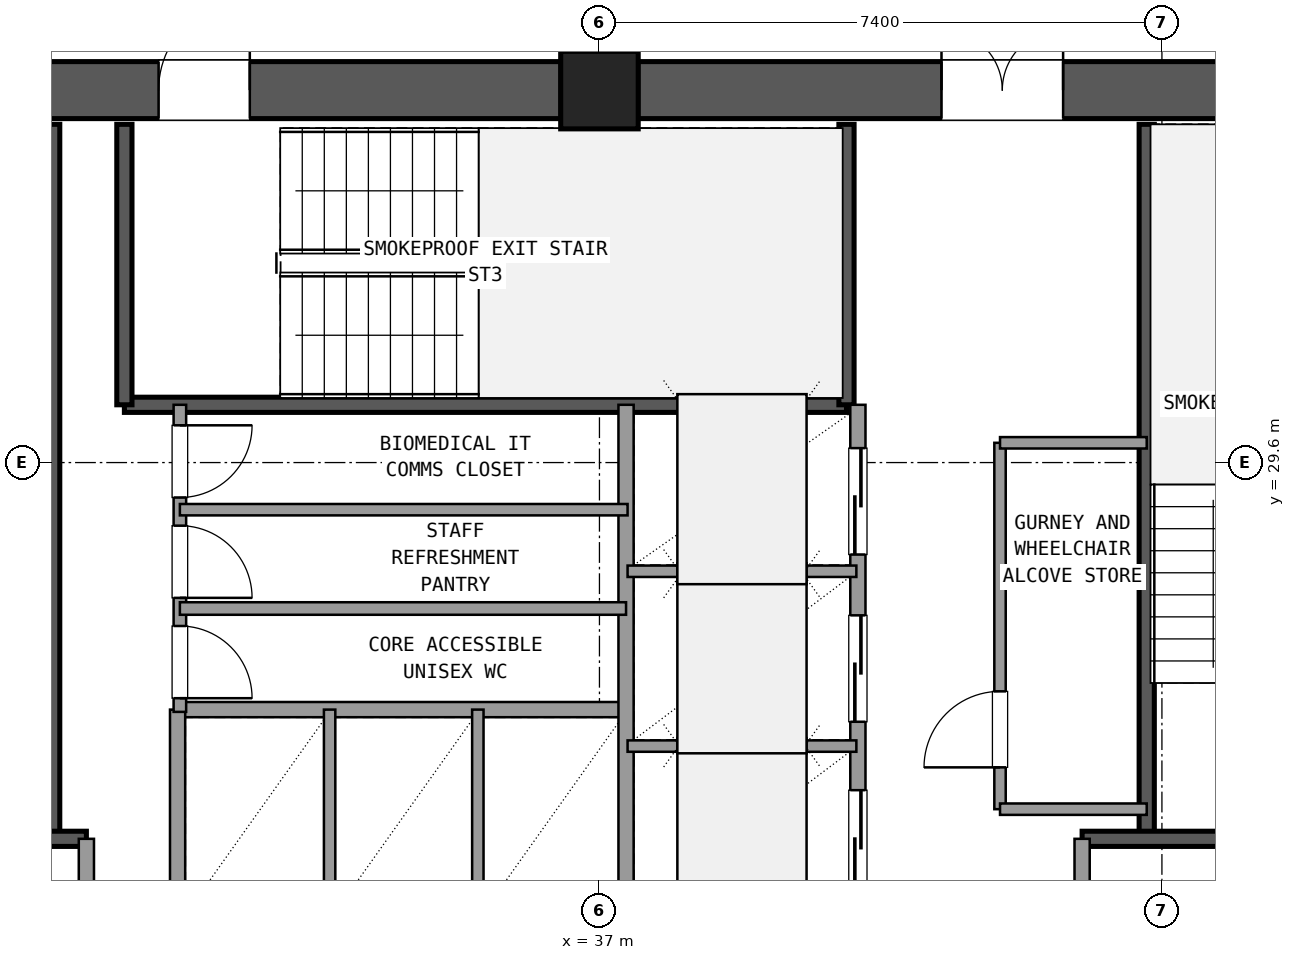
"""IFC4 building model, lengths in metres.
Left out: names, types, materials, properties, quantities, classifications, styles, units other than length and angle.
Written with IfcOpenShell. Run it as: python <this file> out.ifc"""

import sys

from ifc_helpers import new_model, si_unit, direction, frame, frame_2d, origin, origin_2d, place, context, subcontext, project, spatial, rectangle, extrude, element, fill, save


model = new_model("IFC4")
c1 = context("Model", 3, precision=1e-05, world=origin(), true_north=direction((0.0, 1.0)))
c2 = subcontext(c1, "Body", "Model", "MODEL_VIEW")
j1 = project(units=[si_unit("LENGTHUNIT", "METRE"), si_unit("PLANEANGLEUNIT", "RADIAN")], contexts=[c1])
p1 = place(None, origin())
s1 = spatial("IfcSite", under=j1, at=p1, CompositionType="ELEMENT")
p2 = place(p1, origin())
s2 = spatial("IfcBuilding", under=s1, at=p2, CompositionType="ELEMENT")
p3 = place(p2, frame((0.0, 0.0, 81.18)))
s3 = spatial("IfcBuildingStorey", under=s2, at=p3, CompositionType="ELEMENT", Elevation=81.18)
p4 = place(p3, frame((37.0, 34.5, 0.0), z_axis=(0.0, 0.0, 1.0), x_axis=(1.0, 0.0, 0.0)))
e1 = element("IfcColumn", 1, at=p4, inside=s3, PredefinedType="COLUMN", context=c2, shape_type="SweptSolid", body=[
    extrude(rectangle(XDim=1.02, YDim=1.02, at=origin_2d()), origin(), (0.0, 0.0, 1.0), 3.6),
])
p5 = place(p3, frame((47.695, 34.5, 0.0), z_axis=(0.0, 0.0, 1.0), x_axis=(-1.0, 0.0, 0.0)))
e2 = element("IfcWall", 2, at=p5, inside=s3, PredefinedType="SHEAR", context=c2, shape_type="SweptSolid", body=[
    extrude(rectangle(XDim=10.19, YDim=0.75, at=frame_2d((5.095, 0.0))), origin(), (0.0, 0.0, 1.0), 3.32),
])
p6 = place(p5, frame((4.595, 0.0, 0.0)))
e3 = element("IfcOpeningElement", 3, at=p6, cuts=e2, PredefinedType="OPENING", context=c2, shape_type="SweptSolid", body=[
    extrude(rectangle(XDim=1.6, YDim=2.2, at=frame_2d((0.8, 1.1))), frame((0.0, 0.385, 0.0), z_axis=(0.0, -1.0, 0.0), x_axis=(1.0, 0.0, 0.0)), (0.0, 0.0, 1.0), 0.77),
])
p7 = place(p3, frame((36.495, 34.5, 0.0), z_axis=(0.0, 0.0, 1.0), x_axis=(-1.0, 0.0, 0.0)))
e4 = element("IfcWall", 4, at=p7, inside=s3, PredefinedType="SHEAR", context=c2, shape_type="SweptSolid", body=[
    extrude(rectangle(XDim=10.19, YDim=0.75, at=frame_2d((5.095, 0.0))), origin(), (0.0, 0.0, 1.0), 3.32),
])
p8 = place(p7, frame((4.095, 0.0, 0.0)))
e5 = element("IfcOpeningElement", 5, at=p8, cuts=e4, PredefinedType="OPENING", context=c2, shape_type="SweptSolid", body=[
    extrude(rectangle(XDim=1.2, YDim=2.15, at=frame_2d((0.6, 1.075))), frame((0.0, 0.385, 0.0), z_axis=(0.0, -1.0, 0.0), x_axis=(1.0, 0.0, 0.0)), (0.0, 0.0, 1.0), 0.77),
])
p9 = place(p3, frame((29.8, 24.65, 0.0), z_axis=(0.0, 0.0, 1.0), x_axis=(0.0, 1.0, 0.0)))
e6 = element("IfcWall", 6, at=p9, inside=s3, PredefinedType="SHEAR", context=c2, shape_type="SweptSolid", body=[
    extrude(rectangle(XDim=9.4, YDim=0.2, at=frame_2d((4.7, 0.0))), origin(), (0.0, 0.0, 1.0), 3.32),
])
p10 = place(p3, frame((26.25, 24.65, 0.0), z_axis=(0.0, 0.0, 1.0), x_axis=(1.0, 0.0, 0.0)))
e7 = element("IfcWall", 7, at=p10, inside=s3, PredefinedType="SHEAR", context=c2, shape_type="SweptSolid", body=[
    extrude(rectangle(XDim=4.0, YDim=0.2, at=frame_2d((2.0, 0.0))), origin(), (0.0, 0.0, 1.0), 3.32),
])
p11 = place(p10, frame((1.0, 0.0, 0.0)))
e8 = element("IfcOpeningElement", 8, at=p11, cuts=e7, PredefinedType="OPENING", context=c2, shape_type="SweptSolid", body=[
    extrude(rectangle(XDim=1.2, YDim=2.15, at=frame_2d((0.6, 1.075))), frame((0.0, 0.11, 0.0), z_axis=(0.0, -1.0, 0.0), x_axis=(1.0, 0.0, 0.0)), (0.0, 0.0, 1.0), 0.22),
])
p12 = place(p3, frame((44.2, 24.65, 0.0), z_axis=(0.0, 0.0, 1.0), x_axis=(0.0, 1.0, 0.0)))
e9 = element("IfcWall", 9, at=p12, inside=s3, PredefinedType="SHEAR", context=c2, shape_type="SweptSolid", body=[
    extrude(rectangle(XDim=9.4, YDim=0.2, at=frame_2d((4.7, 0.0))), origin(), (0.0, 0.0, 1.0), 3.32),
])
p13 = place(p3, frame((43.35, 24.65, 0.0), z_axis=(0.0, 0.0, 1.0), x_axis=(1.0, 0.0, 0.0)))
e10 = element("IfcWall", 10, at=p13, inside=s3, PredefinedType="SHEAR", context=c2, shape_type="SweptSolid", body=[
    extrude(rectangle(XDim=4.4, YDim=0.2, at=frame_2d((2.2, 0.0))), origin(), (0.0, 0.0, 1.0), 3.32),
])
p14 = place(p13, frame((2.0, 0.0, 0.0)))
e11 = element("IfcOpeningElement", 11, at=p14, cuts=e10, PredefinedType="OPENING", context=c2, shape_type="SweptSolid", body=[
    extrude(rectangle(XDim=1.2, YDim=2.15, at=frame_2d((0.6, 1.075))), frame((0.0, 0.11, 0.0), z_axis=(0.0, -1.0, 0.0), x_axis=(1.0, 0.0, 0.0)), (0.0, 0.0, 1.0), 0.22),
])
p15 = place(p3, frame((30.75, 30.36, 0.0), z_axis=(0.0, 0.0, 1.0), x_axis=(1.0, 0.0, 0.0)))
e12 = element("IfcWall", 12, at=p15, inside=s3, PredefinedType="SHEAR", context=c2, shape_type="SweptSolid", body=[
    extrude(rectangle(XDim=9.5, YDim=0.2, at=frame_2d((4.75, 0.0))), origin(), (0.0, 0.0, 1.0), 3.32),
])
for number, where, z_axis, x_axis in (
    (13, (30.75, 30.36, 0.0), (0.0, 0.0, 1.0), (0.0, 1.0, 0.0)),
    (14, (40.25, 30.36, 0.0), (0.0, 0.0, 1.0), (0.0, 1.0, 0.0)),
):
    element("IfcWall", number, at=place(p3, frame(where, z_axis=z_axis, x_axis=x_axis)), inside=s3, PredefinedType="SHEAR", context=c2, shape_type="SweptSolid", body=[
        extrude(rectangle(XDim=3.69, YDim=0.2, at=frame_2d((1.845, 0.0))), origin(), (0.0, 0.0, 1.0), 3.32),
    ])
p16 = place(p3, frame((30.25, 17.75, 0.0), z_axis=(0.0, 0.0, 1.0), x_axis=(0.0, 1.0, 0.0)))
e15 = element("IfcWall", 15, at=p16, inside=s3, PredefinedType="SOLIDWALL", context=c2, shape_type="SweptSolid", body=[
    extrude(rectangle(XDim=6.9, YDim=0.2, at=frame_2d((3.45, 0.0))), origin(), (0.0, 0.0, 1.0), 2.61),
])
p17 = place(p16, frame((4.15, 0.0, 0.0)))
e16 = element("IfcOpeningElement", 16, at=p17, cuts=e15, PredefinedType="OPENING", context=c2, shape_type="SweptSolid", body=[
    extrude(rectangle(XDim=1.2, YDim=2.15, at=frame_2d((0.6, 1.075))), frame((0.0, 0.11, 0.0), z_axis=(0.0, -1.0, 0.0), x_axis=(1.0, 0.0, 0.0)), (0.0, 0.0, 1.0), 0.22),
])
p18 = place(p3, frame((43.35, 17.75, 0.0), z_axis=(0.0, 0.0, 1.0), x_axis=(0.0, 1.0, 0.0)))
e17 = element("IfcWall", 17, at=p18, inside=s3, PredefinedType="SOLIDWALL", context=c2, shape_type="SweptSolid", body=[
    extrude(rectangle(XDim=6.9, YDim=0.2, at=frame_2d((3.45, 0.0))), origin(), (0.0, 0.0, 1.0), 2.61),
])
p19 = place(p18, frame((4.15, 0.0, 0.0)))
e18 = element("IfcOpeningElement", 18, at=p19, cuts=e17, PredefinedType="OPENING", context=c2, shape_type="SweptSolid", body=[
    extrude(rectangle(XDim=1.2, YDim=2.15, at=frame_2d((0.6, 1.075))), frame((0.0, 0.11, 0.0), z_axis=(0.0, -1.0, 0.0), x_axis=(1.0, 0.0, 0.0)), (0.0, 0.0, 1.0), 0.22),
])
p20 = place(p3, frame((31.45, 26.35, 0.0), z_axis=(0.0, 0.0, 1.0), x_axis=(1.0, 0.0, 0.0)))
e19 = element("IfcWall", 19, at=p20, inside=s3, PredefinedType="SOLIDWALL", context=c2, shape_type="SweptSolid", body=[
    extrude(rectangle(XDim=5.9, YDim=0.2, at=frame_2d((2.95, 0.0))), origin(), (0.0, 0.0, 1.0), 2.61),
])
p21 = place(p3, frame((31.45, 23.54, 0.0), z_axis=(0.0, 0.0, 1.0), x_axis=(0.0, 1.0, 0.0)))
e20 = element("IfcWall", 20, at=p21, inside=s3, PredefinedType="SOLIDWALL", context=c2, shape_type="SweptSolid", body=[
    extrude(rectangle(XDim=2.81, YDim=0.2, at=frame_2d((1.405, 0.0))), origin(), (0.0, 0.0, 1.0), 2.61),
])
for number, where, z_axis, x_axis in (
    (21, (33.45, 23.54, 0.0), (0.0, 0.0, 1.0), (0.0, 1.0, 0.0)),
    (22, (35.4, 23.54, 0.0), (0.0, 0.0, 1.0), (0.0, 1.0, 0.0)),
):
    element("IfcWall", number, at=place(p3, frame(where, z_axis=z_axis, x_axis=x_axis)), inside=s3, PredefinedType="PARTITIONING", context=c2, shape_type="SweptSolid", body=[
        extrude(rectangle(XDim=2.81, YDim=0.15, at=frame_2d((1.405, 0.0))), origin(), (0.0, 0.0, 1.0), 2.61),
    ])
p22 = place(p3, frame((37.35, 23.54, 0.0), z_axis=(0.0, 0.0, 1.0), x_axis=(0.0, 1.0, 0.0)))
e23 = element("IfcWall", 23, at=p22, inside=s3, PredefinedType="SOLIDWALL", context=c2, shape_type="SweptSolid", body=[
    extrude(rectangle(XDim=6.82, YDim=0.2, at=frame_2d((3.41, 0.0))), origin(), (0.0, 0.0, 1.0), 2.61),
])
p23 = place(p3, frame((40.4, 23.54, 0.0), z_axis=(0.0, 0.0, 1.0), x_axis=(0.0, 1.0, 0.0)))
e24 = element("IfcWall", 24, at=p23, inside=s3, PredefinedType="SOLIDWALL", context=c2, shape_type="SweptSolid", body=[
    extrude(rectangle(XDim=6.82, YDim=0.2, at=frame_2d((3.41, 0.0))), origin(), (0.0, 0.0, 1.0), 2.61),
])
p24 = place(p23, frame((0.35, 0.0, 0.0)))
e25 = element("IfcOpeningElement", 25, at=p24, cuts=e24, PredefinedType="OPENING", context=c2, shape_type="SweptSolid", body=[
    extrude(rectangle(XDim=1.4, YDim=2.2, at=frame_2d((0.7, 1.1))), frame((0.0, 0.11, 0.0), z_axis=(0.0, -1.0, 0.0), x_axis=(1.0, 0.0, 0.0)), (0.0, 0.0, 1.0), 0.22),
])
p25 = place(p23, frame((2.65, 0.0, 0.0)))
e26 = element("IfcOpeningElement", 26, at=p25, cuts=e24, PredefinedType="OPENING", context=c2, shape_type="SweptSolid", body=[
    extrude(rectangle(XDim=1.4, YDim=2.2, at=frame_2d((0.7, 1.1))), frame((0.0, 0.11, 0.0), z_axis=(0.0, -1.0, 0.0), x_axis=(1.0, 0.0, 0.0)), (0.0, 0.0, 1.0), 0.22),
])
p26 = place(p23, frame((4.85, 0.0, 0.0)))
e27 = element("IfcOpeningElement", 27, at=p26, cuts=e24, PredefinedType="OPENING", context=c2, shape_type="SweptSolid", body=[
    extrude(rectangle(XDim=1.4, YDim=2.2, at=frame_2d((0.7, 1.1))), frame((0.0, 0.11, 0.0), z_axis=(0.0, -1.0, 0.0), x_axis=(1.0, 0.0, 0.0)), (0.0, 0.0, 1.0), 0.22),
])
for number, where, z_axis, x_axis in (
    (28, (37.37, 25.87, 0.0), (0.0, 0.0, 1.0), (1.0, 0.0, 0.0)),
    (29, (37.37, 28.17, 0.0), (0.0, 0.0, 1.0), (1.0, 0.0, 0.0)),
):
    element("IfcWall", number, at=place(p3, frame(where, z_axis=z_axis, x_axis=x_axis)), inside=s3, PredefinedType="PARTITIONING", context=c2, shape_type="SweptSolid", body=[
        extrude(rectangle(XDim=3.01, YDim=0.15, at=frame_2d((1.505, 0.0))), origin(), (0.0, 0.0, 1.0), 2.61),
    ])
p27 = place(p3, frame((42.27, 25.04, 0.0), z_axis=(0.0, 0.0, 1.0), x_axis=(0.0, 1.0, 0.0)))
e30 = element("IfcWall", 30, at=p27, inside=s3, PredefinedType="PARTITIONING", context=c2, shape_type="SweptSolid", body=[
    extrude(rectangle(XDim=4.82, YDim=0.15, at=frame_2d((2.41, 0.0))), origin(), (0.0, 0.0, 1.0), 2.61),
])
p28 = place(p27, frame((0.55, 0.0, 0.0)))
e31 = element("IfcOpeningElement", 31, at=p28, cuts=e30, PredefinedType="OPENING", context=c2, shape_type="SweptSolid", body=[
    extrude(rectangle(XDim=1.0, YDim=2.15, at=frame_2d((0.5, 1.075))), frame((0.0, 0.085, 0.0), z_axis=(0.0, -1.0, 0.0), x_axis=(1.0, 0.0, 0.0)), (0.0, 0.0, 1.0), 0.17),
])
for number, where, z_axis, x_axis in (
    (32, (42.27, 25.04, 0.0), (0.0, 0.0, 1.0), (1.0, 0.0, 0.0)),
    (33, (42.27, 29.86, 0.0), (0.0, 0.0, 1.0), (1.0, 0.0, 0.0)),
):
    element("IfcWall", number, at=place(p3, frame(where, z_axis=z_axis, x_axis=x_axis)), inside=s3, PredefinedType="PARTITIONING", context=c2, shape_type="SweptSolid", body=[
        extrude(rectangle(XDim=1.93, YDim=0.15, at=frame_2d((0.965, 0.0))), origin(), (0.0, 0.0, 1.0), 2.61),
    ])
p29 = place(p3, frame((31.48, 26.32, 0.0), z_axis=(0.0, 0.0, 1.0), x_axis=(0.0, 1.0, 0.0)))
e34 = element("IfcWall", 34, at=p29, inside=s3, PredefinedType="PLUMBINGWALL", context=c2, shape_type="SweptSolid", body=[
    extrude(rectangle(XDim=4.04, YDim=0.165, at=frame_2d((2.02, 0.0))), origin(), (0.0, 0.0, 1.0), 2.61),
])
p30 = place(p29, frame((0.18, 0.0, 0.0)))
e35 = element("IfcOpeningElement", 35, at=p30, cuts=e34, PredefinedType="OPENING", context=c2, shape_type="SweptSolid", body=[
    extrude(rectangle(XDim=0.95, YDim=2.1, at=frame_2d((0.475, 1.05))), frame((0.0, 0.093, 0.0), z_axis=(0.0, -1.0, 0.0), x_axis=(1.0, 0.0, 0.0)), (0.0, 0.0, 1.0), 0.185),
])
p31 = place(p29, frame((1.5, 0.0, 0.0)))
e36 = element("IfcOpeningElement", 36, at=p31, cuts=e34, PredefinedType="OPENING", context=c2, shape_type="SweptSolid", body=[
    extrude(rectangle(XDim=0.95, YDim=2.1, at=frame_2d((0.475, 1.05))), frame((0.0, 0.093, 0.0), z_axis=(0.0, -1.0, 0.0), x_axis=(1.0, 0.0, 0.0)), (0.0, 0.0, 1.0), 0.185),
])
p32 = place(p29, frame((2.82, 0.0, 0.0)))
e37 = element("IfcOpeningElement", 37, at=p32, cuts=e34, PredefinedType="OPENING", context=c2, shape_type="SweptSolid", body=[
    extrude(rectangle(XDim=0.95, YDim=2.1, at=frame_2d((0.475, 1.05))), frame((0.0, 0.093, 0.0), z_axis=(0.0, -1.0, 0.0), x_axis=(1.0, 0.0, 0.0)), (0.0, 0.0, 1.0), 0.185),
])
p33 = place(p3, frame((31.48, 27.68, 0.0), z_axis=(0.0, 0.0, 1.0), x_axis=(1.0, 0.0, 0.0)))
e38 = element("IfcWall", 38, at=p33, inside=s3, PredefinedType="PLUMBINGWALL", context=c2, shape_type="SweptSolid", body=[
    extrude(rectangle(XDim=5.87, YDim=0.165, at=frame_2d((2.935, 0.0))), origin(), (0.0, 0.0, 1.0), 2.61),
])
p34 = place(p3, frame((31.48, 28.98, 0.0), z_axis=(0.0, 0.0, 1.0), x_axis=(1.0, 0.0, 0.0)))
e39 = element("IfcWall", 39, at=p34, inside=s3, PredefinedType="PARTITIONING", context=c2, shape_type="SweptSolid", body=[
    extrude(rectangle(XDim=5.89, YDim=0.15, at=frame_2d((2.945, 0.0))), origin(), (0.0, 0.0, 1.0), 2.61),
])
p35 = place(p3, frame((37.0, 34.95, 0.0), z_axis=(0.0, 0.0, 1.0), x_axis=(0.0, 1.0, 0.0)))
e40 = element("IfcWall", 40, at=p35, inside=s3, PredefinedType="PARTITIONING", context=c2, shape_type="SweptSolid", body=[
    extrude(rectangle(XDim=3.21, YDim=0.18, at=frame_2d((1.605, 0.0))), origin(), (0.0, 0.0, 1.0), 2.61),
])
p36 = place(p35, frame((0.605, 0.0, 0.0)))
e41 = element("IfcOpeningElement", 41, at=p36, cuts=e40, PredefinedType="OPENING", context=c2, shape_type="SweptSolid", body=[
    extrude(rectangle(XDim=2.0, YDim=2.2, at=frame_2d((1.0, 1.1))), frame((0.0, 0.1, 0.0), z_axis=(0.0, -1.0, 0.0), x_axis=(1.0, 0.0, 0.0)), (0.0, 0.0, 1.0), 0.2),
])
p37 = place(p6, frame((1.6, 0.0, 0.0), z_axis=(0.0, 0.0, 1.0), x_axis=(-1.0, 0.0, 0.0)))
e42 = element("IfcDoor", 42, at=p37, inside=s3, OperationType="DOUBLE_DOOR_SINGLE_SWING", PredefinedType="DOOR", context=c2, shape_type="SweptSolid", body=[
    extrude(rectangle(XDim=1.6, YDim=2.2, at=frame_2d((0.8, 1.1))), frame((0.0, 0.025, 0.0), z_axis=(0.0, -1.0, 0.0), x_axis=(1.0, 0.0, 0.0)), (0.0, 0.0, 1.0), 0.05),
])
fill(e3, e42)
p38 = place(p8, frame((1.2, 0.0, 0.0), z_axis=(0.0, 0.0, 1.0), x_axis=(-1.0, 0.0, 0.0)))
e43 = element("IfcDoor", 43, at=p38, inside=s3, OperationType="SINGLE_SWING_LEFT", PredefinedType="DOOR", context=c2, shape_type="SweptSolid", body=[
    extrude(rectangle(XDim=1.2, YDim=2.15, at=frame_2d((0.6, 1.075))), frame((0.0, 0.025, 0.0), z_axis=(0.0, -1.0, 0.0), x_axis=(1.0, 0.0, 0.0)), (0.0, 0.0, 1.0), 0.05),
])
fill(e5, e43)
p39 = place(p24, origin())
e44 = element("IfcDoor", 44, at=p39, inside=s3, OperationType="SLIDING_TO_LEFT", PredefinedType="DOOR", context=c2, shape_type="SweptSolid", body=[
    extrude(rectangle(XDim=1.4, YDim=2.2, at=frame_2d((0.7, 1.1))), frame((0.0, 0.025, 0.0), z_axis=(0.0, -1.0, 0.0), x_axis=(1.0, 0.0, 0.0)), (0.0, 0.0, 1.0), 0.05),
])
fill(e25, e44)
p40 = place(p25, origin())
e45 = element("IfcDoor", 45, at=p40, inside=s3, OperationType="SLIDING_TO_LEFT", PredefinedType="DOOR", context=c2, shape_type="SweptSolid", body=[
    extrude(rectangle(XDim=1.4, YDim=2.2, at=frame_2d((0.7, 1.1))), frame((0.0, 0.025, 0.0), z_axis=(0.0, -1.0, 0.0), x_axis=(1.0, 0.0, 0.0)), (0.0, 0.0, 1.0), 0.05),
])
fill(e26, e45)
p41 = place(p26, origin())
e46 = element("IfcDoor", 46, at=p41, inside=s3, OperationType="SLIDING_TO_RIGHT", PredefinedType="DOOR", context=c2, shape_type="SweptSolid", body=[
    extrude(rectangle(XDim=1.4, YDim=2.2, at=frame_2d((0.7, 1.1))), frame((0.0, 0.025, 0.0), z_axis=(0.0, -1.0, 0.0), x_axis=(1.0, 0.0, 0.0)), (0.0, 0.0, 1.0), 0.05),
])
fill(e27, e46)
p42 = place(p28, origin())
e47 = element("IfcDoor", 47, at=p42, inside=s3, OperationType="SINGLE_SWING_LEFT", PredefinedType="DOOR", context=c2, shape_type="SweptSolid", body=[
    extrude(rectangle(XDim=1.0, YDim=2.15, at=frame_2d((0.5, 1.075))), frame((0.0, 0.025, 0.0), z_axis=(0.0, -1.0, 0.0), x_axis=(1.0, 0.0, 0.0)), (0.0, 0.0, 1.0), 0.05),
])
fill(e31, e47)
p43 = place(p30, frame((0.95, 0.0, 0.0), z_axis=(0.0, 0.0, 1.0), x_axis=(-1.0, 0.0, 0.0)))
e48 = element("IfcDoor", 48, at=p43, inside=s3, OperationType="SINGLE_SWING_LEFT", PredefinedType="DOOR", context=c2, shape_type="SweptSolid", body=[
    extrude(rectangle(XDim=0.95, YDim=2.1, at=frame_2d((0.475, 1.05))), frame((0.0, 0.025, 0.0), z_axis=(0.0, -1.0, 0.0), x_axis=(1.0, 0.0, 0.0)), (0.0, 0.0, 1.0), 0.05),
])
fill(e35, e48)
p44 = place(p31, frame((0.95, 0.0, 0.0), z_axis=(0.0, 0.0, 1.0), x_axis=(-1.0, 0.0, 0.0)))
e49 = element("IfcDoor", 49, at=p44, inside=s3, OperationType="SINGLE_SWING_LEFT", PredefinedType="DOOR", context=c2, shape_type="SweptSolid", body=[
    extrude(rectangle(XDim=0.95, YDim=2.1, at=frame_2d((0.475, 1.05))), frame((0.0, 0.025, 0.0), z_axis=(0.0, -1.0, 0.0), x_axis=(1.0, 0.0, 0.0)), (0.0, 0.0, 1.0), 0.05),
])
fill(e36, e49)
p45 = place(p32, frame((0.95, 0.0, 0.0), z_axis=(0.0, 0.0, 1.0), x_axis=(-1.0, 0.0, 0.0)))
e50 = element("IfcDoor", 50, at=p45, inside=s3, OperationType="SINGLE_SWING_RIGHT", PredefinedType="DOOR", context=c2, shape_type="SweptSolid", body=[
    extrude(rectangle(XDim=0.95, YDim=2.1, at=frame_2d((0.475, 1.05))), frame((0.0, 0.025, 0.0), z_axis=(0.0, -1.0, 0.0), x_axis=(1.0, 0.0, 0.0)), (0.0, 0.0, 1.0), 0.05),
])
fill(e37, e50)
save(model, sys.argv[1])
